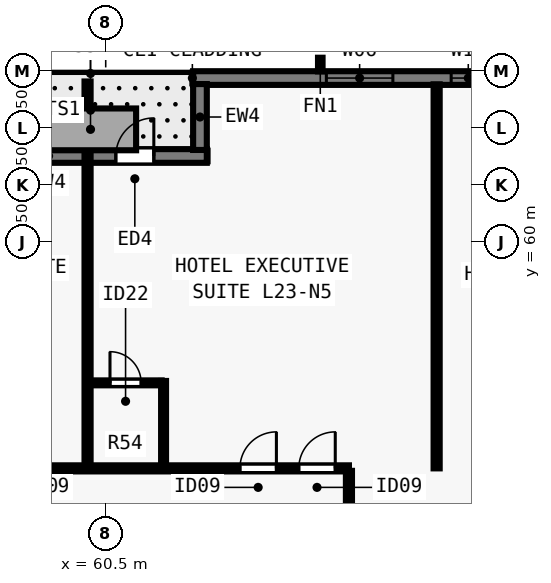
"""IFC4 building model, lengths in metres.
Left out: names, types, materials, properties, quantities, classifications, styles, units other than length and angle.
Written with IfcOpenShell. Run it as: python <this file> out.ifc"""

import sys

from ifc_helpers import new_model, si_unit, direction, frame, frame_2d, origin, place, context, subcontext, project, spatial, rectangle, extrude, element, fill, save


model = new_model("IFC4")
c1 = context("Model", 3, precision=1e-05, world=origin(), true_north=direction((0.0, 1.0)))
c2 = subcontext(c1, "Body", "Model", "MODEL_VIEW")
j1 = project(units=[si_unit("LENGTHUNIT", "METRE"), si_unit("PLANEANGLEUNIT", "RADIAN")], contexts=[c1])
p1 = place(None, origin())
s1 = spatial("IfcSite", under=j1, at=p1, CompositionType="ELEMENT")
p2 = place(p1, origin())
s2 = spatial("IfcBuilding", under=s1, at=p2, CompositionType="ELEMENT")
p3 = place(p2, frame((0.0, 0.0, 86.5)))
s3 = spatial("IfcBuildingStorey", under=s2, at=p3, CompositionType="ELEMENT", Elevation=86.5)
p4 = place(p3, frame((62.8, 64.32, 0.0), z_axis=(0.0, 0.0, 1.0), x_axis=(1.0, 0.0, 0.0)))
e1 = element("IfcWall", 1, at=p4, inside=s3, PredefinedType="SOLIDWALL", context=c2, shape_type="SweptSolid", body=[
    extrude(rectangle(XDim=11.362, YDim=0.36, at=frame_2d((5.681, 0.0))), origin(), (0.0, 0.0, 1.0), 3.28),
])
p5 = place(p4, frame((3.506, 0.0, 0.8)))
e2 = element("IfcOpeningElement", 2, at=p5, cuts=e1, PredefinedType="OPENING", context=c2, shape_type="SweptSolid", body=[
    extrude(rectangle(XDim=1.75, YDim=1.544, at=frame_2d((0.875, 0.772))), frame((0.0, 0.19, 0.0), z_axis=(0.0, -1.0, 0.0), x_axis=(1.0, 0.0, 0.0)), (0.0, 0.0, 1.0), 0.38),
])
p6 = place(p4, frame((6.79, 0.0, 0.8)))
e3 = element("IfcOpeningElement", 3, at=p6, cuts=e1, PredefinedType="OPENING", context=c2, shape_type="SweptSolid", body=[
    extrude(rectangle(XDim=0.9, YDim=1.544, at=frame_2d((0.45, 0.772))), frame((0.0, 0.19, 0.0), z_axis=(0.0, -1.0, 0.0), x_axis=(1.0, 0.0, 0.0)), (0.0, 0.0, 1.0), 0.38),
])
p7 = place(p3, frame((57.378, 62.27, 0.0), z_axis=(0.0, 0.0, 1.0), x_axis=(1.0, 0.0, 0.0)))
e4 = element("IfcWall", 4, at=p7, inside=s3, PredefinedType="SOLIDWALL", context=c2, shape_type="SweptSolid", body=[
    extrude(rectangle(XDim=5.782, YDim=0.36, at=frame_2d((2.891, 0.0))), origin(), (0.0, 0.0, 1.0), 3.28),
])
p8 = place(p7, frame((3.388, 0.0, 0.0)))
e5 = element("IfcOpeningElement", 5, at=p8, cuts=e4, PredefinedType="OPENING", context=c2, shape_type="SweptSolid", body=[
    extrude(rectangle(XDim=1.0, YDim=2.15, at=frame_2d((0.5, 1.075))), frame((0.0, 0.19, 0.0), z_axis=(0.0, -1.0, 0.0), x_axis=(1.0, 0.0, 0.0)), (0.0, 0.0, 1.0), 0.38),
])
p9 = place(p3, frame((62.98, 62.428, 0.0), z_axis=(0.0, 0.0, 1.0), x_axis=(0.0, 1.0, 0.0)))
e6 = element("IfcWall", 6, at=p9, inside=s3, PredefinedType="SOLIDWALL", context=c2, shape_type="SweptSolid", body=[
    extrude(rectangle(XDim=1.734, YDim=0.36, at=frame_2d((0.867, 0.0))), origin(), (0.0, 0.0, 1.0), 3.28),
])
p10 = place(p3, frame((37.1, 54.05, 0.0), z_axis=(0.0, 0.0, 1.0), x_axis=(1.0, 0.0, 0.0)))
e7 = element("IfcWall", 7, at=p10, inside=s3, PredefinedType="PARTITIONING", context=c2, shape_type="SweptSolid", body=[
    extrude(rectangle(XDim=29.8, YDim=0.16, at=frame_2d((14.9, 0.0))), origin(), (0.0, 0.0, 1.0), 3.28),
])
p11 = place(p10, frame((0.91, 0.0, 0.0)))
e8 = element("IfcOpeningElement", 8, at=p11, cuts=e7, PredefinedType="OPENING", context=c2, shape_type="SweptSolid", body=[
    extrude(rectangle(XDim=0.96, YDim=2.15, at=frame_2d((0.48, 1.075))), frame((0.0, 0.09, 0.0), z_axis=(0.0, -1.0, 0.0), x_axis=(1.0, 0.0, 0.0)), (0.0, 0.0, 1.0), 0.18),
])
p12 = place(p10, frame((3.03, 0.0, 0.0)))
e9 = element("IfcOpeningElement", 9, at=p12, cuts=e7, PredefinedType="OPENING", context=c2, shape_type="SweptSolid", body=[
    extrude(rectangle(XDim=0.96, YDim=2.15, at=frame_2d((0.48, 1.075))), frame((0.0, 0.09, 0.0), z_axis=(0.0, -1.0, 0.0), x_axis=(1.0, 0.0, 0.0)), (0.0, 0.0, 1.0), 0.18),
])
p13 = place(p10, frame((11.39, 0.0, 0.0)))
e10 = element("IfcOpeningElement", 10, at=p13, cuts=e7, PredefinedType="OPENING", context=c2, shape_type="SweptSolid", body=[
    extrude(rectangle(XDim=0.96, YDim=2.15, at=frame_2d((0.48, 1.075))), frame((0.0, 0.09, 0.0), z_axis=(0.0, -1.0, 0.0), x_axis=(1.0, 0.0, 0.0)), (0.0, 0.0, 1.0), 0.18),
])
p14 = place(p10, frame((19.75, 0.0, 0.0)))
e11 = element("IfcOpeningElement", 11, at=p14, cuts=e7, PredefinedType="OPENING", context=c2, shape_type="SweptSolid", body=[
    extrude(rectangle(XDim=0.96, YDim=2.15, at=frame_2d((0.48, 1.075))), frame((0.0, 0.09, 0.0), z_axis=(0.0, -1.0, 0.0), x_axis=(1.0, 0.0, 0.0)), (0.0, 0.0, 1.0), 0.18),
])
p15 = place(p10, frame((26.931, 0.0, 0.0)))
e12 = element("IfcOpeningElement", 12, at=p15, cuts=e7, PredefinedType="OPENING", context=c2, shape_type="SweptSolid", body=[
    extrude(rectangle(XDim=0.96, YDim=2.15, at=frame_2d((0.48, 1.075))), frame((0.0, 0.09, 0.0), z_axis=(0.0, -1.0, 0.0), x_axis=(1.0, 0.0, 0.0)), (0.0, 0.0, 1.0), 0.18),
])
p16 = place(p10, frame((28.48, 0.0, 0.0)))
e13 = element("IfcOpeningElement", 13, at=p16, cuts=e7, PredefinedType="OPENING", context=c2, shape_type="SweptSolid", body=[
    extrude(rectangle(XDim=0.96, YDim=2.15, at=frame_2d((0.48, 1.075))), frame((0.0, 0.09, 0.0), z_axis=(0.0, -1.0, 0.0), x_axis=(1.0, 0.0, 0.0)), (0.0, 0.0, 1.0), 0.18),
])
p17 = place(p3, frame((66.9, 24.015, 0.0), z_axis=(0.0, 0.0, 1.0), x_axis=(0.0, 1.0, 0.0)))
e14 = element("IfcWall", 14, at=p17, inside=s3, PredefinedType="PARTITIONING", context=c2, shape_type="SweptSolid", body=[
    extrude(rectangle(XDim=29.97, YDim=0.16, at=frame_2d((14.985, 0.0))), origin(), (0.0, 0.0, 1.0), 3.28),
])
p18 = place(p17, frame((3.911, 0.0, 0.0)))
e15 = element("IfcOpeningElement", 15, at=p18, cuts=e14, PredefinedType="OPENING", context=c2, shape_type="SweptSolid", body=[
    extrude(rectangle(XDim=0.96, YDim=2.15, at=frame_2d((0.48, 1.075))), frame((0.0, 0.09, 0.0), z_axis=(0.0, -1.0, 0.0), x_axis=(1.0, 0.0, 0.0)), (0.0, 0.0, 1.0), 0.18),
])
p19 = place(p17, frame((9.544, 0.0, 0.0)))
e16 = element("IfcOpeningElement", 16, at=p19, cuts=e14, PredefinedType="OPENING", context=c2, shape_type="SweptSolid", body=[
    extrude(rectangle(XDim=0.96, YDim=2.15, at=frame_2d((0.48, 1.075))), frame((0.0, 0.09, 0.0), z_axis=(0.0, -1.0, 0.0), x_axis=(1.0, 0.0, 0.0)), (0.0, 0.0, 1.0), 0.18),
])
p20 = place(p17, frame((15.625, 0.0, 0.0)))
e17 = element("IfcOpeningElement", 17, at=p20, cuts=e14, PredefinedType="OPENING", context=c2, shape_type="SweptSolid", body=[
    extrude(rectangle(XDim=0.96, YDim=2.15, at=frame_2d((0.48, 1.075))), frame((0.0, 0.09, 0.0), z_axis=(0.0, -1.0, 0.0), x_axis=(1.0, 0.0, 0.0)), (0.0, 0.0, 1.0), 0.18),
])
p21 = place(p17, frame((21.584, 0.0, 0.0)))
e18 = element("IfcOpeningElement", 18, at=p21, cuts=e14, PredefinedType="OPENING", context=c2, shape_type="SweptSolid", body=[
    extrude(rectangle(XDim=0.96, YDim=2.15, at=frame_2d((0.48, 1.075))), frame((0.0, 0.09, 0.0), z_axis=(0.0, -1.0, 0.0), x_axis=(1.0, 0.0, 0.0)), (0.0, 0.0, 1.0), 0.18),
])
p22 = place(p17, frame((27.494, 0.0, 0.0)))
e19 = element("IfcOpeningElement", 19, at=p22, cuts=e14, PredefinedType="OPENING", context=c2, shape_type="SweptSolid", body=[
    extrude(rectangle(XDim=0.96, YDim=2.15, at=frame_2d((0.48, 1.075))), frame((0.0, 0.09, 0.0), z_axis=(0.0, -1.0, 0.0), x_axis=(1.0, 0.0, 0.0)), (0.0, 0.0, 1.0), 0.18),
])
p23 = place(p3, frame((60.022, 54.115, 0.0), z_axis=(0.0, 0.0, 1.0), x_axis=(0.0, 1.0, 0.0)))
e20 = element("IfcWall", 20, at=p23, inside=s3, PredefinedType="PARTITIONING", context=c2, shape_type="SweptSolid", body=[
    extrude(rectangle(XDim=10.115, YDim=0.16, at=frame_2d((5.058, 0.0))), origin(), (0.0, 0.0, 1.0), 3.28),
])
p24 = place(p3, frame((62.022, 54.115, 0.0), z_axis=(0.0, 0.0, 1.0), x_axis=(0.0, 1.0, 0.0)))
e21 = element("IfcWall", 21, at=p24, inside=s3, PredefinedType="PLUMBINGWALL", context=c2, shape_type="SweptSolid", body=[
    extrude(rectangle(XDim=2.235, YDim=0.13, at=frame_2d((1.118, 0.0))), origin(), (0.0, 0.0, 1.0), 3.28),
])
p25 = place(p3, frame((60.087, 56.3, 0.0), z_axis=(0.0, 0.0, 1.0), x_axis=(1.0, 0.0, 0.0)))
e22 = element("IfcWall", 22, at=p25, inside=s3, PredefinedType="PLUMBINGWALL", context=c2, shape_type="SweptSolid", body=[
    extrude(rectangle(XDim=1.885, YDim=0.13, at=frame_2d((0.942, 0.0))), origin(), (0.0, 0.0, 1.0), 3.28),
])
p26 = place(p25, frame((0.525, 0.0, 0.0)))
e23 = element("IfcOpeningElement", 23, at=p26, cuts=e22, PredefinedType="OPENING", context=c2, shape_type="SweptSolid", body=[
    extrude(rectangle(XDim=0.82, YDim=2.1, at=frame_2d((0.41, 1.05))), frame((0.0, 0.075, 0.0), z_axis=(0.0, -1.0, 0.0), x_axis=(1.0, 0.0, 0.0)), (0.0, 0.0, 1.0), 0.15),
])
p27 = place(p3, frame((69.208, 54.05, 0.0), z_axis=(0.0, 0.0, 1.0), x_axis=(0.0, 1.0, 0.0)))
e24 = element("IfcWall", 24, at=p27, inside=s3, PredefinedType="PARTITIONING", context=c2, shape_type="SweptSolid", body=[
    extrude(rectangle(XDim=10.105, YDim=0.16, at=frame_2d((5.052, 0.0))), origin(), (0.0, 0.0, 1.0), 2.439),
])
p28 = place(p5, origin())
e25 = element("IfcWindow", 25, at=p28, inside=s3, PartitioningType="SINGLE_PANEL", PredefinedType="WINDOW", context=c2, shape_type="SweptSolid", body=[
    extrude(rectangle(XDim=1.75, YDim=1.544, at=frame_2d((0.875, 0.772))), frame((0.0, -0.05, 0.0), z_axis=(0.0, -1.0, 0.0), x_axis=(1.0, 0.0, 0.0)), (0.0, 0.0, 1.0), 0.06),
])
fill(e2, e25)
p29 = place(p8, origin())
e26 = element("IfcDoor", 26, at=p29, inside=s3, OperationType="SINGLE_SWING_RIGHT", PredefinedType="DOOR", context=c2, shape_type="SweptSolid", body=[
    extrude(rectangle(XDim=1.0, YDim=2.15, at=frame_2d((0.5, 1.075))), frame((0.0, 0.025, 0.0), z_axis=(0.0, -1.0, 0.0), x_axis=(1.0, 0.0, 0.0)), (0.0, 0.0, 1.0), 0.05),
])
fill(e5, e26)
p30 = place(p6, origin())
e27 = element("IfcWindow", 27, at=p30, inside=s3, PartitioningType="SINGLE_PANEL", PredefinedType="WINDOW", context=c2, shape_type="SweptSolid", body=[
    extrude(rectangle(XDim=0.9, YDim=1.544, at=frame_2d((0.45, 0.772))), frame((0.0, -0.04, 0.0), z_axis=(0.0, -1.0, 0.0), x_axis=(1.0, 0.0, 0.0)), (0.0, 0.0, 1.0), 0.06),
])
fill(e3, e27)
p31 = place(p26, origin())
e28 = element("IfcDoor", 28, at=p31, inside=s3, OperationType="SINGLE_SWING_LEFT", PredefinedType="DOOR", context=c2, shape_type="SweptSolid", body=[
    extrude(rectangle(XDim=0.82, YDim=2.1, at=frame_2d((0.41, 1.05))), frame((0.0, 0.025, 0.0), z_axis=(0.0, -1.0, 0.0), x_axis=(1.0, 0.0, 0.0)), (0.0, 0.0, 1.0), 0.05),
])
fill(e23, e28)
p32 = place(p15, origin())
e29 = element("IfcDoor", 29, at=p32, inside=s3, OperationType="SINGLE_SWING_RIGHT", PredefinedType="DOOR", context=c2, shape_type="SweptSolid", body=[
    extrude(rectangle(XDim=0.96, YDim=2.15, at=frame_2d((0.48, 1.075))), frame((0.0, 0.025, 0.0), z_axis=(0.0, -1.0, 0.0), x_axis=(1.0, 0.0, 0.0)), (0.0, 0.0, 1.0), 0.05),
])
fill(e12, e29)
p33 = place(p16, origin())
e30 = element("IfcDoor", 30, at=p33, inside=s3, OperationType="SINGLE_SWING_RIGHT", PredefinedType="DOOR", context=c2, shape_type="SweptSolid", body=[
    extrude(rectangle(XDim=0.96, YDim=2.15, at=frame_2d((0.48, 1.075))), frame((0.0, 0.025, 0.0), z_axis=(0.0, -1.0, 0.0), x_axis=(1.0, 0.0, 0.0)), (0.0, 0.0, 1.0), 0.05),
])
fill(e13, e30)
save(model, sys.argv[1])
